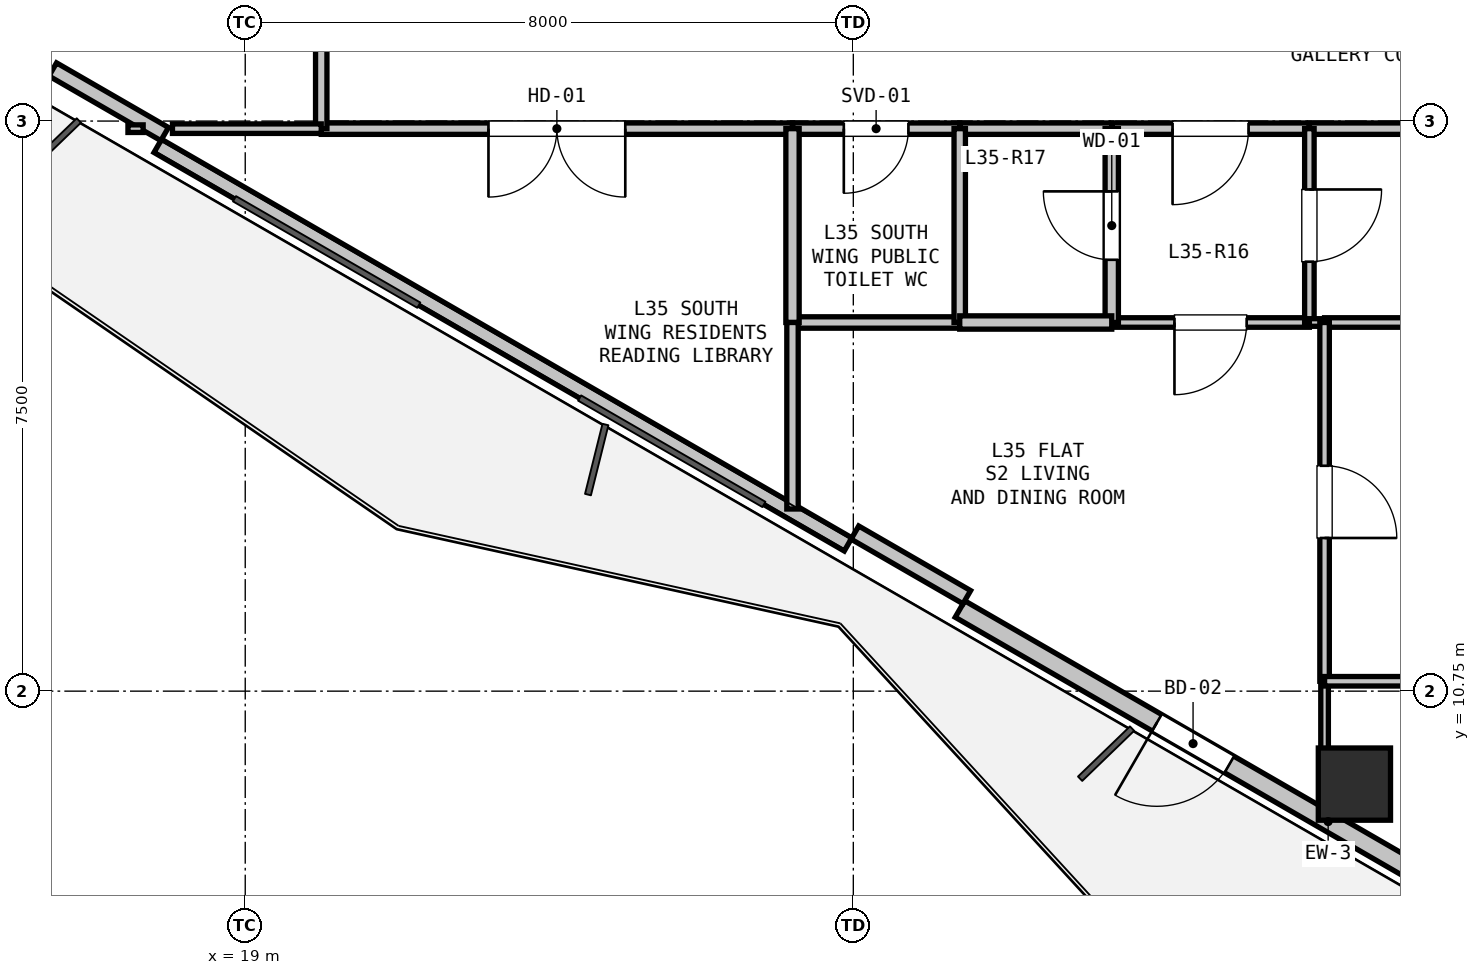
"""IFC4 building model, lengths in metres.
Left out: names, types, materials, properties, quantities, classifications, styles, units other than length and angle.
Written with IfcOpenShell. Run it as: python <this file> out.ifc"""

import sys

from ifc_helpers import new_model, si_unit, direction, frame, frame_2d, origin, origin_2d, place, context, subcontext, project, spatial, rectangle, hollow_rectangle, extrude, element, fill, save


model = new_model("IFC4")
c1 = context("Model", 3, precision=1e-05, world=origin(), true_north=direction((0.0, 1.0)))
c2 = subcontext(c1, "Body", "Model", "MODEL_VIEW")
j1 = project(units=[si_unit("LENGTHUNIT", "METRE"), si_unit("PLANEANGLEUNIT", "RADIAN")], contexts=[c1])
p1 = place(None, origin())
s1 = spatial("IfcSite", under=j1, at=p1, CompositionType="ELEMENT")
p2 = place(p1, origin())
s2 = spatial("IfcBuilding", under=s1, at=p2, CompositionType="ELEMENT")
p3 = place(p2, frame((0.0, 0.0, 127.8)))
s3 = spatial("IfcBuildingStorey", under=s2, at=p3, CompositionType="ELEMENT", Elevation=127.8)
p4 = place(p3, frame((33.593, 9.527, 0.0), z_axis=(0.0, 0.0, 1.0), x_axis=(1.0, 0.0, 0.0)))
e1 = element("IfcColumn", 1, at=p4, inside=s3, PredefinedType="COLUMN", context=c2, shape_type="SweptSolid", body=[
    extrude(hollow_rectangle(XDim=0.95, YDim=0.95, WallThickness=0.028, at=origin_2d()), origin(), (0.0, 0.0, 1.0), 3.3),
])
p5 = place(p3, frame((38.091, 6.237, 0.0), z_axis=(0.0, 0.0, 1.0), x_axis=(-0.86602239209, 0.500005216371, 0.0)))
e2 = element("IfcWall", 2, at=p5, inside=s3, PredefinedType="SOLIDWALL", context=c2, shape_type="SweptSolid", body=[
    extrude(rectangle(XDim=11.186, YDim=0.25, at=frame_2d((5.593, 0.0))), origin(), (0.0, 0.0, 1.0), 2.68),
])
p6 = place(p5, frame((7.095, 0.0, 0.0)))
e3 = element("IfcOpeningElement", 3, at=p6, cuts=e2, PredefinedType="OPENING", context=c2, shape_type="SweptSolid", body=[
    extrude(rectangle(XDim=1.1, YDim=2.1, at=frame_2d((0.55, 1.05))), frame((0.0, 0.135, 0.0), z_axis=(0.0, -1.0, 0.0), x_axis=(1.0, 0.0, 0.0)), (0.0, 0.0, 1.0), 0.27),
])
p7 = place(p5, frame((2.322, 0.0, 0.9)))
e4 = element("IfcOpeningElement", 4, at=p7, cuts=e2, PredefinedType="OPENING", context=c2, shape_type="SweptSolid", body=[
    extrude(rectangle(XDim=1.2, YDim=1.4, at=frame_2d((0.6, 0.7))), frame((0.0, 0.135, 0.0), z_axis=(0.0, -1.0, 0.0), x_axis=(1.0, 0.0, 0.0)), (0.0, 0.0, 1.0), 0.27),
])
p8 = place(p3, frame((26.931, 12.68, 0.0), z_axis=(0.0, 0.0, 1.0), x_axis=(-0.866026619769, 0.499997893847, 0.0)))
e5 = element("IfcWall", 5, at=p8, inside=s3, PredefinedType="PARAPET", context=c2, shape_type="SweptSolid", body=[
    extrude(rectangle(XDim=10.486, YDim=0.2, at=frame_2d((5.243, 0.0))), origin(), (0.0, 0.0, 1.0), 0.2),
])
for number, where, z_axis, x_axis in (
    (6, (28.493, 11.986, 0.0), (0.0, 0.0, 1.0), (-0.866, 0.5, 0.0)),
    (7, (17.94, 18.079, 0.0), (0.0, 0.0, 1.0), (-0.866, 0.5, 0.0)),
):
    element("IfcWall", number, at=place(p3, frame(where, z_axis=z_axis, x_axis=x_axis)), inside=s3, PredefinedType="PARAPET", context=c2, shape_type="SweptSolid", body=[
        extrude(rectangle(XDim=1.7, YDim=0.2, at=frame_2d((0.85, 0.0))), origin(), (0.0, 0.0, 1.0), 2.68),
    ])
p9 = place(p3, frame((39.2, 18.15, 0.0), z_axis=(0.0, 0.0, 1.0), x_axis=(-1.0, 0.0, 0.0)))
e8 = element("IfcWall", 8, at=p9, inside=s3, PredefinedType="PARTITIONING", context=c2, shape_type="SweptSolid", body=[
    extrude(rectangle(XDim=6.2, YDim=0.15, at=frame_2d((3.1, 0.0))), origin(), (0.0, 0.0, 1.0), 2.433),
])
p10 = place(p3, frame((33.0, 18.15, 0.0), z_axis=(0.0, 0.0, 1.0), x_axis=(-1.0, 0.0, 0.0)))
e9 = element("IfcWall", 9, at=p10, inside=s3, PredefinedType="PARTITIONING", context=c2, shape_type="SweptSolid", body=[
    extrude(rectangle(XDim=2.6, YDim=0.15, at=frame_2d((1.3, 0.0))), origin(), (0.0, 0.0, 1.0), 3.06),
])
p11 = place(p10, frame((0.8, 0.0, 0.0)))
e10 = element("IfcOpeningElement", 10, at=p11, cuts=e9, PredefinedType="OPENING", context=c2, shape_type="SweptSolid", body=[
    extrude(rectangle(XDim=1.0, YDim=2.15, at=frame_2d((0.5, 1.075))), frame((0.0, 0.085, 0.0), z_axis=(0.0, -1.0, 0.0), x_axis=(1.0, 0.0, 0.0)), (0.0, 0.0, 1.0), 0.17),
])
p12 = place(p3, frame((30.4, 18.15, 0.0), z_axis=(0.0, 0.0, 1.0), x_axis=(-1.0, 0.0, 0.0)))
e11 = element("IfcWall", 11, at=p12, inside=s3, PredefinedType="PARTITIONING", context=c2, shape_type="SweptSolid", body=[
    extrude(rectangle(XDim=2.0, YDim=0.15, at=frame_2d((1.0, 0.0))), origin(), (0.0, 0.0, 1.0), 3.06),
])
p13 = place(p3, frame((28.4, 18.15, 0.0), z_axis=(0.0, 0.0, 1.0), x_axis=(-1.0, 0.0, 0.0)))
e12 = element("IfcWall", 12, at=p13, inside=s3, PredefinedType="PARTITIONING", context=c2, shape_type="SweptSolid", body=[
    extrude(rectangle(XDim=2.2, YDim=0.15, at=frame_2d((1.1, 0.0))), origin(), (0.0, 0.0, 1.0), 3.06),
])
p14 = place(p13, frame((0.675, 0.0, 0.0)))
e13 = element("IfcOpeningElement", 13, at=p14, cuts=e12, PredefinedType="OPENING", context=c2, shape_type="SweptSolid", body=[
    extrude(rectangle(XDim=0.85, YDim=2.1, at=frame_2d((0.425, 1.05))), frame((0.0, 0.085, 0.0), z_axis=(0.0, -1.0, 0.0), x_axis=(1.0, 0.0, 0.0)), (0.0, 0.0, 1.0), 0.17),
])
p15 = place(p3, frame((26.2, 18.15, 0.0), z_axis=(0.0, 0.0, 1.0), x_axis=(-1.0, 0.0, 0.0)))
e14 = element("IfcWall", 14, at=p15, inside=s3, PredefinedType="PARTITIONING", context=c2, shape_type="SweptSolid", body=[
    extrude(rectangle(XDim=6.2, YDim=0.15, at=frame_2d((3.1, 0.0))), origin(), (0.0, 0.0, 1.0), 2.433),
])
p16 = place(p15, frame((2.2, 0.0, 0.0)))
e15 = element("IfcOpeningElement", 15, at=p16, cuts=e14, PredefinedType="OPENING", context=c2, shape_type="SweptSolid", body=[
    extrude(rectangle(XDim=1.8, YDim=2.2, at=frame_2d((0.9, 1.1))), frame((0.0, 0.085, 0.0), z_axis=(0.0, -1.0, 0.0), x_axis=(1.0, 0.0, 0.0)), (0.0, 0.0, 1.0), 0.17),
])
p17 = place(p3, frame((20.0, 18.15, 0.0), z_axis=(0.0, 0.0, 1.0), x_axis=(0.0, 1.0, 0.0)))
e16 = element("IfcWall", 16, at=p17, inside=s3, PredefinedType="PARTITIONING", context=c2, shape_type="SweptSolid", body=[
    extrude(rectangle(XDim=2.6, YDim=0.15, at=frame_2d((1.3, 0.0))), origin(), (0.0, 0.0, 1.0), 3.06),
])
p18 = place(p3, frame((33.0, 15.6, 0.0), z_axis=(0.0, 0.0, 1.0), x_axis=(-1.0, 0.0, 0.0)))
e17 = element("IfcWall", 17, at=p18, inside=s3, PredefinedType="PARTITIONING", context=c2, shape_type="SweptSolid", body=[
    extrude(rectangle(XDim=2.6, YDim=0.125, at=frame_2d((1.3, 0.0))), origin(), (0.0, 0.0, 1.0), 3.06),
])
p19 = place(p18, frame((0.825, 0.0, 0.0)))
e18 = element("IfcOpeningElement", 18, at=p19, cuts=e17, PredefinedType="OPENING", context=c2, shape_type="SweptSolid", body=[
    extrude(rectangle(XDim=0.95, YDim=2.1, at=frame_2d((0.475, 1.05))), frame((0.0, 0.073, 0.0), z_axis=(0.0, -1.0, 0.0), x_axis=(1.0, 0.0, 0.0)), (0.0, 0.0, 1.0), 0.145),
])
p20 = place(p3, frame((30.4, 15.6, 0.0), z_axis=(0.0, 0.0, 1.0), x_axis=(0.0, 1.0, 0.0)))
e19 = element("IfcWall", 19, at=p20, inside=s3, PredefinedType="PLUMBINGWALL", context=c2, shape_type="SweptSolid", body=[
    extrude(rectangle(XDim=2.55, YDim=0.175, at=frame_2d((1.275, 0.0))), origin(), (0.0, 0.0, 1.0), 3.06),
])
p21 = place(p20, frame((0.825, 0.0, 0.0)))
e20 = element("IfcOpeningElement", 20, at=p21, cuts=e19, PredefinedType="OPENING", context=c2, shape_type="SweptSolid", body=[
    extrude(rectangle(XDim=0.9, YDim=2.1, at=frame_2d((0.45, 1.05))), frame((0.0, 0.097, 0.0), z_axis=(0.0, -1.0, 0.0), x_axis=(1.0, 0.0, 0.0)), (0.0, 0.0, 1.0), 0.195),
])
p22 = place(p3, frame((33.0, 18.15, 0.0), z_axis=(0.0, 0.0, 1.0), x_axis=(0.0, -1.0, 0.0)))
e21 = element("IfcWall", 21, at=p22, inside=s3, PredefinedType="PARTITIONING", context=c2, shape_type="SweptSolid", body=[
    extrude(rectangle(XDim=2.55, YDim=0.125, at=frame_2d((1.275, 0.0))), origin(), (0.0, 0.0, 1.0), 3.06),
])
p23 = place(p22, frame((0.8, 0.0, 0.0)))
e22 = element("IfcOpeningElement", 22, at=p23, cuts=e21, PredefinedType="OPENING", context=c2, shape_type="SweptSolid", body=[
    extrude(rectangle(XDim=0.95, YDim=2.1, at=frame_2d((0.475, 1.05))), frame((0.0, 0.073, 0.0), z_axis=(0.0, -1.0, 0.0), x_axis=(1.0, 0.0, 0.0)), (0.0, 0.0, 1.0), 0.145),
])
p24 = place(p3, frame((28.4, 15.6, 0.0), z_axis=(0.0, 0.0, 1.0), x_axis=(-1.0, 0.0, 0.0)))
e23 = element("IfcWall", 23, at=p24, inside=s3, PredefinedType="PARTITIONING", context=c2, shape_type="SweptSolid", body=[
    extrude(rectangle(XDim=2.2, YDim=0.15, at=frame_2d((1.1, 0.0))), origin(), (0.0, 0.0, 1.0), 2.433),
])
p25 = place(p3, frame((26.2, 15.6, 0.0), z_axis=(0.0, 0.0, 1.0), x_axis=(0.0, 1.0, 0.0)))
e24 = element("IfcWall", 24, at=p25, inside=s3, PredefinedType="PLUMBINGWALL", context=c2, shape_type="SweptSolid", body=[
    extrude(rectangle(XDim=2.55, YDim=0.175, at=frame_2d((1.275, 0.0))), origin(), (0.0, 0.0, 1.0), 2.433),
])
p26 = place(p3, frame((28.4, 18.15, 0.0), z_axis=(0.0, 0.0, 1.0), x_axis=(0.0, -1.0, 0.0)))
e25 = element("IfcWall", 25, at=p26, inside=s3, PredefinedType="PARTITIONING", context=c2, shape_type="SweptSolid", body=[
    extrude(rectangle(XDim=2.55, YDim=0.15, at=frame_2d((1.275, 0.0))), origin(), (0.0, 0.0, 1.0), 3.06),
])
p27 = place(p3, frame((30.4, 15.6, 0.0), z_axis=(0.0, 0.0, 1.0), x_axis=(-1.0, 0.0, 0.0)))
e26 = element("IfcWall", 26, at=p27, inside=s3, PredefinedType="PLUMBINGWALL", context=c2, shape_type="SweptSolid", body=[
    extrude(rectangle(XDim=2.0, YDim=0.175, at=frame_2d((1.0, 0.0))), origin(), (0.0, 0.0, 1.0), 3.06),
])
p28 = place(p3, frame((42.07, 15.6, 0.0), z_axis=(0.0, 0.0, 1.0), x_axis=(-1.0, 0.0, 0.0)))
e27 = element("IfcWall", 27, at=p28, inside=s3, PredefinedType="PARTITIONING", context=c2, shape_type="SweptSolid", body=[
    extrude(rectangle(XDim=8.87, YDim=0.125, at=frame_2d((4.435, 0.0))), origin(), (0.0, 0.0, 1.0), 2.365),
])
p29 = place(p28, frame((3.96, 0.0, 0.0)))
e28 = element("IfcOpeningElement", 28, at=p29, cuts=e27, PredefinedType="OPENING", context=c2, shape_type="SweptSolid", body=[
    extrude(rectangle(XDim=0.95, YDim=2.1, at=frame_2d((0.475, 1.05))), frame((0.0, 0.073, 0.0), z_axis=(0.0, -1.0, 0.0), x_axis=(1.0, 0.0, 0.0)), (0.0, 0.0, 1.0), 0.145),
])
for number, where, z_axis, x_axis in (
    (29, (33.2, 15.6, 0.0), (0.0, 0.0, 1.0), (-1.0, 0.0, 0.0)),
    (30, (17.457, 18.15, 0.0), (0.0, 0.0, 1.0), (1.0, 0.0, 0.0)),
):
    element("IfcWall", number, at=place(p3, frame(where, z_axis=z_axis, x_axis=x_axis)), inside=s3, PredefinedType="PARTITIONING", context=c2, shape_type="SweptSolid", body=[
        extrude(rectangle(XDim=0.2, YDim=0.1, at=frame_2d((0.1, 0.0))), origin(), (0.0, 0.0, 1.0), 3.06),
    ])
p30 = place(p3, frame((18.042, 18.15, 0.0), z_axis=(0.0, 0.0, 1.0), x_axis=(1.0, 0.0, 0.0)))
e31 = element("IfcWall", 31, at=p30, inside=s3, PredefinedType="PARTITIONING", context=c2, shape_type="SweptSolid", body=[
    extrude(rectangle(XDim=1.958, YDim=0.125, at=frame_2d((0.979, 0.0))), origin(), (0.0, 0.0, 1.0), 2.365),
])
p31 = place(p3, frame((26.2, 15.6, 0.0), z_axis=(0.0, 0.0, 1.0), x_axis=(0.0, -1.0, 0.0)))
e32 = element("IfcWall", 32, at=p31, inside=s3, PredefinedType="PARTITIONING", context=c2, shape_type="SweptSolid", body=[
    extrude(rectangle(XDim=2.454, YDim=0.15, at=frame_2d((1.227, 0.0))), origin(), (0.0, 0.0, 1.0), 2.365),
])
p32 = place(p3, frame((33.2, 15.6, 0.0), z_axis=(0.0, 0.0, 1.0), x_axis=(0.0, -1.0, 0.0)))
e33 = element("IfcWall", 33, at=p32, inside=s3, PredefinedType="PARTITIONING", context=c2, shape_type="SweptSolid", body=[
    extrude(rectangle(XDim=4.72, YDim=0.125, at=frame_2d((2.36, 0.0))), origin(), (0.0, 0.0, 1.0), 3.06),
])
p33 = place(p32, frame((1.885, 0.0, 0.0)))
e34 = element("IfcOpeningElement", 34, at=p33, cuts=e33, PredefinedType="OPENING", context=c2, shape_type="SweptSolid", body=[
    extrude(rectangle(XDim=0.95, YDim=2.1, at=frame_2d((0.475, 1.05))), frame((0.0, 0.073, 0.0), z_axis=(0.0, -1.0, 0.0), x_axis=(1.0, 0.0, 0.0)), (0.0, 0.0, 1.0), 0.145),
])
p34 = place(p3, frame((33.2, 10.88, 0.0), z_axis=(0.0, 0.0, 1.0), x_axis=(0.0, -1.0, 0.0)))
e35 = element("IfcWall", 35, at=p34, inside=s3, PredefinedType="PARTITIONING", context=c2, shape_type="SweptSolid", body=[
    extrude(rectangle(XDim=1.647, YDim=0.1, at=frame_2d((0.823, 0.0))), origin(), (0.0, 0.0, 1.0), 2.365),
])
p35 = place(p3, frame((33.2, 10.88, 0.0), z_axis=(0.0, 0.0, 1.0), x_axis=(1.0, 0.0, 0.0)))
e36 = element("IfcWall", 36, at=p35, inside=s3, PredefinedType="PARTITIONING", context=c2, shape_type="SweptSolid", body=[
    extrude(rectangle(XDim=8.87, YDim=0.125, at=frame_2d((4.435, 0.0))), origin(), (0.0, 0.0, 1.0), 2.433),
])
p36 = place(p35, frame((3.96, 0.0, 0.0)))
e37 = element("IfcOpeningElement", 37, at=p36, cuts=e36, PredefinedType="OPENING", context=c2, shape_type="SweptSolid", body=[
    extrude(rectangle(XDim=0.95, YDim=2.1, at=frame_2d((0.475, 1.05))), frame((0.0, 0.073, 0.0), z_axis=(0.0, -1.0, 0.0), x_axis=(1.0, 0.0, 0.0)), (0.0, 0.0, 1.0), 0.145),
])
p37 = place(p6, origin())
e38 = element("IfcDoor", 38, at=p37, inside=s3, OperationType="SINGLE_SWING_RIGHT", PredefinedType="DOOR", context=c2, shape_type="SweptSolid", body=[
    extrude(rectangle(XDim=1.1, YDim=2.1, at=frame_2d((0.55, 1.05))), frame((0.0, 0.025, 0.0), z_axis=(0.0, -1.0, 0.0), x_axis=(1.0, 0.0, 0.0)), (0.0, 0.0, 1.0), 0.05),
])
fill(e3, e38)
p38 = place(p11, origin())
e39 = element("IfcDoor", 39, at=p38, inside=s3, OperationType="SINGLE_SWING_RIGHT", PredefinedType="DOOR", context=c2, shape_type="SweptSolid", body=[
    extrude(rectangle(XDim=1.0, YDim=2.15, at=frame_2d((0.5, 1.075))), frame((0.0, 0.025, 0.0), z_axis=(0.0, -1.0, 0.0), x_axis=(1.0, 0.0, 0.0)), (0.0, 0.0, 1.0), 0.05),
])
fill(e10, e39)
p39 = place(p14, origin())
e40 = element("IfcDoor", 40, at=p39, inside=s3, OperationType="SINGLE_SWING_RIGHT", PredefinedType="DOOR", context=c2, shape_type="SweptSolid", body=[
    extrude(rectangle(XDim=0.85, YDim=2.1, at=frame_2d((0.425, 1.05))), frame((0.0, 0.025, 0.0), z_axis=(0.0, -1.0, 0.0), x_axis=(1.0, 0.0, 0.0)), (0.0, 0.0, 1.0), 0.05),
])
fill(e13, e40)
p40 = place(p16, origin())
e41 = element("IfcDoor", 41, at=p40, inside=s3, OperationType="DOUBLE_DOOR_SINGLE_SWING", PredefinedType="DOOR", context=c2, shape_type="SweptSolid", body=[
    extrude(rectangle(XDim=1.8, YDim=2.2, at=frame_2d((0.9, 1.1))), frame((0.0, 0.025, 0.0), z_axis=(0.0, -1.0, 0.0), x_axis=(1.0, 0.0, 0.0)), (0.0, 0.0, 1.0), 0.05),
])
fill(e15, e41)
p41 = place(p21, origin())
e42 = element("IfcDoor", 42, at=p41, inside=s3, OperationType="SINGLE_SWING_RIGHT", PredefinedType="DOOR", context=c2, shape_type="SweptSolid", body=[
    extrude(rectangle(XDim=0.9, YDim=2.1, at=frame_2d((0.45, 1.05))), frame((0.0, 0.025, 0.0), z_axis=(0.0, -1.0, 0.0), x_axis=(1.0, 0.0, 0.0)), (0.0, 0.0, 1.0), 0.05),
])
fill(e20, e42)
p42 = place(p23, origin())
e43 = element("IfcDoor", 43, at=p42, inside=s3, OperationType="SINGLE_SWING_LEFT", PredefinedType="DOOR", context=c2, shape_type="SweptSolid", body=[
    extrude(rectangle(XDim=0.95, YDim=2.1, at=frame_2d((0.475, 1.05))), frame((0.0, 0.025, 0.0), z_axis=(0.0, -1.0, 0.0), x_axis=(1.0, 0.0, 0.0)), (0.0, 0.0, 1.0), 0.05),
])
fill(e22, e43)
p43 = place(p19, origin())
e44 = element("IfcDoor", 44, at=p43, inside=s3, OperationType="SINGLE_SWING_RIGHT", PredefinedType="DOOR", context=c2, shape_type="SweptSolid", body=[
    extrude(rectangle(XDim=0.95, YDim=2.1, at=frame_2d((0.475, 1.05))), frame((0.0, 0.025, 0.0), z_axis=(0.0, -1.0, 0.0), x_axis=(1.0, 0.0, 0.0)), (0.0, 0.0, 1.0), 0.05),
])
fill(e18, e44)
p44 = place(p33, origin())
e45 = element("IfcDoor", 45, at=p44, inside=s3, OperationType="SINGLE_SWING_RIGHT", PredefinedType="DOOR", context=c2, shape_type="SweptSolid", body=[
    extrude(rectangle(XDim=0.95, YDim=2.1, at=frame_2d((0.475, 1.05))), frame((0.0, 0.025, 0.0), z_axis=(0.0, -1.0, 0.0), x_axis=(1.0, 0.0, 0.0)), (0.0, 0.0, 1.0), 0.05),
])
fill(e34, e45)
save(model, sys.argv[1])
